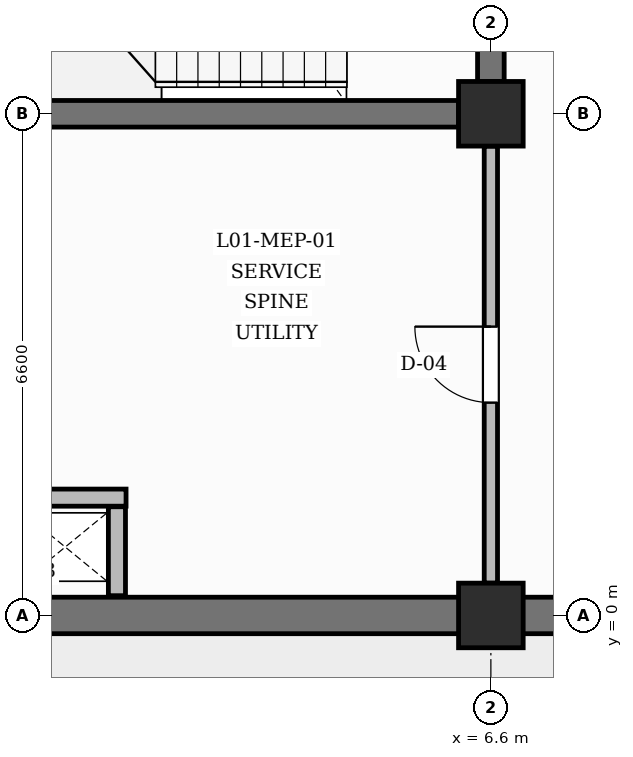
"""IFC4 building model, lengths in metres.
Left out: names, types, materials, properties, quantities, classifications, styles, units other than length and angle.
Written with IfcOpenShell. Run it as: python <this file> out.ifc"""

import sys

from ifc_helpers import new_model, si_unit, direction, frame, frame_2d, origin, origin_2d, place, context, subcontext, project, spatial, rectangle, extrude, element, fill, save


model = new_model("IFC4")
c1 = context("Model", 3, precision=1e-05, world=origin(), true_north=direction((0.0, 1.0)))
c2 = subcontext(c1, "Body", "Model", "MODEL_VIEW")
j1 = project(units=[si_unit("LENGTHUNIT", "METRE"), si_unit("PLANEANGLEUNIT", "RADIAN")], contexts=[c1])
p1 = place(None, origin())
s1 = spatial("IfcSite", under=j1, at=p1, CompositionType="ELEMENT")
p2 = place(p1, origin())
s2 = spatial("IfcBuilding", under=s1, at=p2, CompositionType="ELEMENT")
p3 = place(p2, frame((0.0, 0.0, 5.4)))
s3 = spatial("IfcBuildingStorey", under=s2, at=p3, CompositionType="ELEMENT", Elevation=5.4)
for number, where, z_axis, x_axis in (
    (1, (6.6, 0.0, 0.0), (0.0, 0.0, 1.0), (1.0, 0.0, 0.0)),
    (2, (6.6, 6.6, 0.0), (0.0, 0.0, 1.0), (1.0, 0.0, 0.0)),
):
    element("IfcColumn", number, at=place(p3, frame(where, z_axis=z_axis, x_axis=x_axis)), inside=s3, PredefinedType="COLUMN", context=c2, shape_type="SweptSolid", body=[
        extrude(rectangle(XDim=0.85, YDim=0.85, at=origin_2d()), origin(), (0.0, 0.0, 1.0), 4.8),
    ])
for number, where, z_axis, x_axis in (
    (3, (0.425, 0.0, 0.0), (0.0, 0.0, 1.0), (1.0, 0.0, 0.0)),
    (4, (7.025, 0.0, 0.0), (0.0, 0.0, 1.0), (1.0, 0.0, 0.0)),
):
    element("IfcWall", number, at=place(p3, frame(where, z_axis=z_axis, x_axis=x_axis)), inside=s3, PredefinedType="SOLIDWALL", context=c2, shape_type="SweptSolid", body=[
        extrude(rectangle(XDim=5.75, YDim=0.48, at=frame_2d((2.875, 0.0))), origin(), (0.0, 0.0, 1.0), 3.85),
    ])
p4 = place(p3, frame((0.425, 6.6, 0.0), z_axis=(0.0, 0.0, 1.0), x_axis=(1.0, 0.0, 0.0)))
e5 = element("IfcWall", 5, at=p4, inside=s3, PredefinedType="SHEAR", context=c2, shape_type="SweptSolid", body=[
    extrude(rectangle(XDim=5.75, YDim=0.35, at=frame_2d((2.875, 0.0))), origin(), (0.0, 0.0, 1.0), 3.7),
])
p5 = place(p3, frame((6.6, 7.025, 0.0), z_axis=(0.0, 0.0, 1.0), x_axis=(0.0, 1.0, 0.0)))
e6 = element("IfcWall", 6, at=p5, inside=s3, PredefinedType="SHEAR", context=c2, shape_type="SweptSolid", body=[
    extrude(rectangle(XDim=5.75, YDim=0.35, at=frame_2d((2.875, 0.0))), origin(), (0.0, 0.0, 1.0), 3.7),
])
p6 = place(p5, frame((2.325, 0.0, 0.0)))
e7 = element("IfcOpeningElement", 7, at=p6, cuts=e6, PredefinedType="OPENING", context=c2, shape_type="SweptSolid", body=[
    extrude(rectangle(XDim=1.1, YDim=2.15, at=frame_2d((0.55, 1.075))), frame((0.0, 0.185, 0.0), z_axis=(0.0, -1.0, 0.0), x_axis=(1.0, 0.0, 0.0)), (0.0, 0.0, 1.0), 0.37),
])
p7 = place(p3, frame((1.68, 0.26, 0.0), z_axis=(0.0, 0.0, 1.0), x_axis=(0.0, 1.0, 0.0)))
e8 = element("IfcWall", 8, at=p7, inside=s3, PredefinedType="PARTITIONING", context=c2, shape_type="SweptSolid", body=[
    extrude(rectangle(XDim=1.17, YDim=0.225, at=frame_2d((0.585, 0.0))), origin(), (0.0, 0.0, 1.0), 4.45),
])
p8 = place(p3, frame((0.26, 1.55, 0.0), z_axis=(0.0, 0.0, 1.0), x_axis=(1.0, 0.0, 0.0)))
e9 = element("IfcWall", 9, at=p8, inside=s3, PredefinedType="PARTITIONING", context=c2, shape_type="SweptSolid", body=[
    extrude(rectangle(XDim=1.54, YDim=0.225, at=frame_2d((0.77, 0.0))), origin(), (0.0, 0.0, 1.0), 4.45),
])
p9 = place(p3, frame((6.6, 0.425, 0.0), z_axis=(0.0, 0.0, 1.0), x_axis=(0.0, 1.0, 0.0)))
e10 = element("IfcWall", 10, at=p9, inside=s3, PredefinedType="PARTITIONING", context=c2, shape_type="SweptSolid", body=[
    extrude(rectangle(XDim=5.75, YDim=0.175, at=frame_2d((2.875, 0.0))), origin(), (0.0, 0.0, 1.0), 3.7),
])
p10 = place(p9, frame((2.375, 0.0, 0.0)))
e11 = element("IfcOpeningElement", 11, at=p10, cuts=e10, PredefinedType="OPENING", context=c2, shape_type="SweptSolid", body=[
    extrude(rectangle(XDim=1.0, YDim=2.1, at=frame_2d((0.5, 1.05))), frame((0.0, 0.097, 0.0), z_axis=(0.0, -1.0, 0.0), x_axis=(1.0, 0.0, 0.0)), (0.0, 0.0, 1.0), 0.195),
])
p11 = place(p10, origin())
e12 = element("IfcDoor", 12, at=p11, inside=s3, OperationType="SINGLE_SWING_RIGHT", PredefinedType="DOOR", context=c2, shape_type="SweptSolid", body=[
    extrude(rectangle(XDim=1.0, YDim=2.1, at=frame_2d((0.5, 1.05))), frame((0.0, 0.025, 0.0), z_axis=(0.0, -1.0, 0.0), x_axis=(1.0, 0.0, 0.0)), (0.0, 0.0, 1.0), 0.05),
])
fill(e11, e12)
save(model, sys.argv[1])
